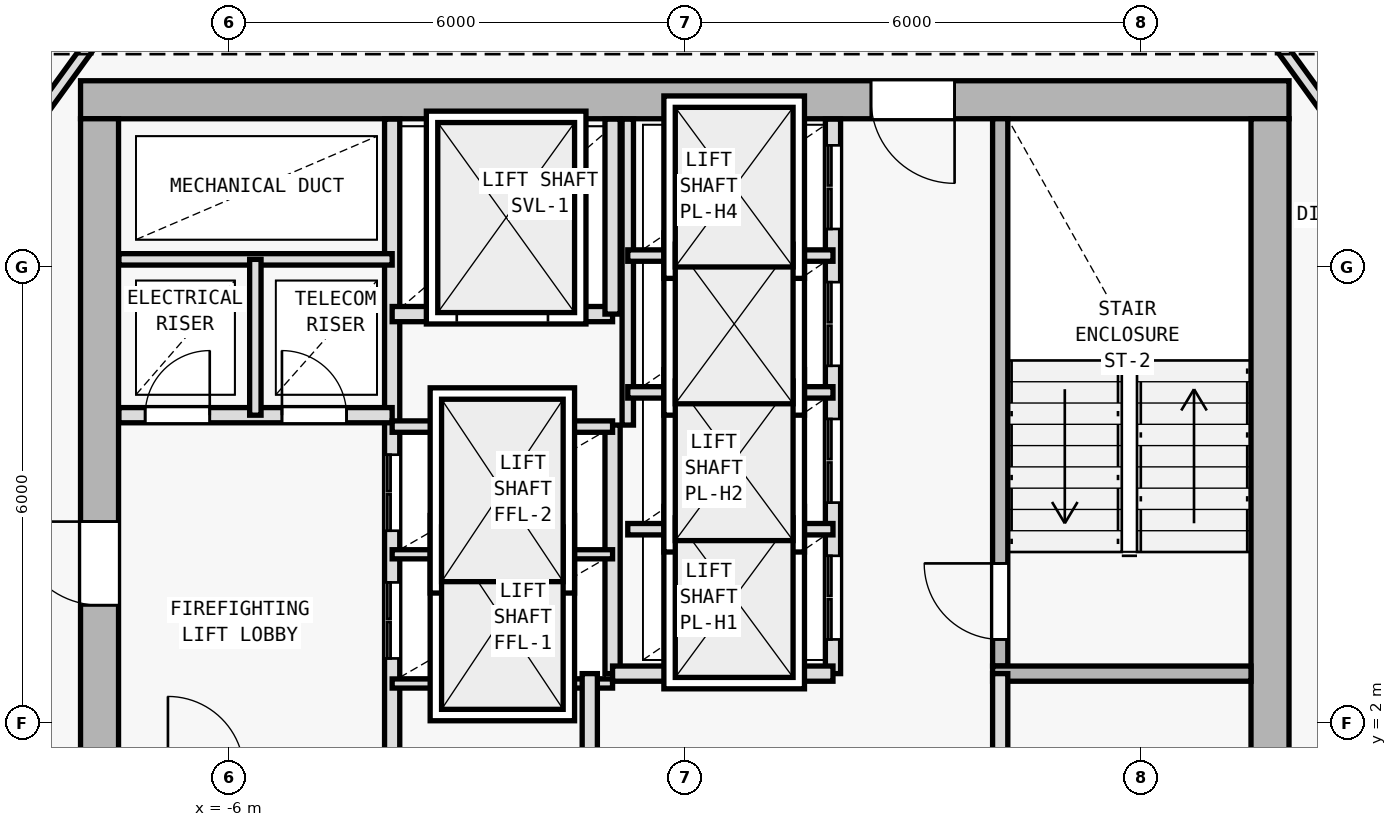
"""IFC4 building model, lengths in metres.
Left out: names, types, materials, properties, quantities, classifications, styles, units other than length and angle.
Written with IfcOpenShell. Run it as: python <this file> out.ifc"""

import sys

from ifc_helpers import new_model, si_unit, direction, frame, frame_2d, origin, origin_2d, place, context, subcontext, project, spatial, rectangle, i_section, extrude, element, fill, save


model = new_model("IFC4")
c1 = context("Model", 3, precision=1e-05, world=origin(), true_north=direction((0.0, 1.0)))
c2 = subcontext(c1, "Body", "Model", "MODEL_VIEW")
j1 = project(units=[si_unit("LENGTHUNIT", "METRE"), si_unit("PLANEANGLEUNIT", "RADIAN")], contexts=[c1])
p1 = place(None, origin())
s1 = spatial("IfcSite", under=j1, at=p1, CompositionType="ELEMENT")
p2 = place(p1, origin())
s2 = spatial("IfcBuilding", under=s1, at=p2, CompositionType="ELEMENT")
p3 = place(p2, frame((0.0, 0.0, 265.2)))
s3 = spatial("IfcBuildingStorey", under=s2, at=p3, CompositionType="ELEMENT", Elevation=265.2)
for number, where, z_axis, x_axis in (
    (1, (7.7, 10.2, 0.0), (0.0, 0.0, 1.0), (1.0, 0.0, 0.0)),
    (2, (-7.7, 10.2, 0.0), (0.0, 0.0, 1.0), (1.0, 0.0, 0.0)),
    (3, (-7.7, 2.0, 0.0), (0.0, 0.0, 1.0), (1.0, 0.0, 0.0)),
):
    element("IfcColumn", number, at=place(p3, frame(where, z_axis=z_axis, x_axis=x_axis)), inside=s3, PredefinedType="COLUMN", context=c2, shape_type="SweptSolid", body=[
        extrude(i_section(OverallWidth=0.374, OverallDepth=0.372, WebThickness=0.012, FlangeThickness=0.02, FilletRadius=0.015, at=origin_2d()), origin(), (0.0, 0.0, 1.0), 3.6),
    ])
p4 = place(p3, frame((7.95, 10.2, 0.0), z_axis=(0.0, 0.0, 1.0), x_axis=(-1.0, 0.0, 0.0)))
e4 = element("IfcWall", 4, at=p4, inside=s3, PredefinedType="SHEAR", context=c2, shape_type="SweptSolid", body=[
    extrude(rectangle(XDim=15.9, YDim=0.5, at=frame_2d((7.95, 0.0))), origin(), (0.0, 0.0, 1.0), 3.35),
])
p5 = place(p4, frame((4.4, 0.0, 0.0)))
e5 = element("IfcOpeningElement", 5, at=p5, cuts=e4, PredefinedType="OPENING", context=c2, shape_type="SweptSolid", body=[
    extrude(rectangle(XDim=1.1, YDim=2.15, at=frame_2d((0.55, 1.075))), frame((0.0, 0.26, 0.0), z_axis=(0.0, -1.0, 0.0), x_axis=(1.0, 0.0, 0.0)), (0.0, 0.0, 1.0), 0.52),
])
p6 = place(p3, frame((-7.7, -9.15, 0.0), z_axis=(0.0, 0.0, 1.0), x_axis=(0.0, 1.0, 0.0)))
e6 = element("IfcWall", 6, at=p6, inside=s3, PredefinedType="SHEAR", context=c2, shape_type="SweptSolid", body=[
    extrude(rectangle(XDim=19.1, YDim=0.5, at=frame_2d((9.55, 0.0))), origin(), (0.0, 0.0, 1.0), 3.35),
])
p7 = place(p6, frame((12.7, 0.0, 0.0)))
e7 = element("IfcOpeningElement", 7, at=p7, cuts=e6, PredefinedType="OPENING", context=c2, shape_type="SweptSolid", body=[
    extrude(rectangle(XDim=1.1, YDim=2.15, at=frame_2d((0.55, 1.075))), frame((0.0, 0.26, 0.0), z_axis=(0.0, -1.0, 0.0), x_axis=(1.0, 0.0, 0.0)), (0.0, 0.0, 1.0), 0.52),
])
p8 = place(p3, frame((7.7, 9.95, 0.0), z_axis=(0.0, 0.0, 1.0), x_axis=(0.0, -1.0, 0.0)))
e8 = element("IfcWall", 8, at=p8, inside=s3, PredefinedType="SHEAR", context=c2, shape_type="SweptSolid", body=[
    extrude(rectangle(XDim=19.1, YDim=0.5, at=frame_2d((9.55, 0.0))), origin(), (0.0, 0.0, 1.0), 3.35),
])
p9 = place(p3, frame((-3.85, 1.35, 0.0), z_axis=(0.0, 0.0, 1.0), x_axis=(0.0, 1.0, 0.0)))
e9 = element("IfcWall", 9, at=p9, inside=s3, PredefinedType="SOLIDWALL", context=c2, shape_type="SweptSolid", body=[
    extrude(rectangle(XDim=8.595, YDim=0.2, at=frame_2d((4.297, 0.0))), origin(), (0.0, 0.0, 1.0), 3.35),
])
p10 = place(p9, frame((1.5, 0.0, 0.0)))
e10 = element("IfcOpeningElement", 10, at=p10, cuts=e9, PredefinedType="OPENING", context=c2, shape_type="SweptSolid", body=[
    extrude(rectangle(XDim=1.0, YDim=2.15, at=frame_2d((0.5, 1.075))), frame((0.0, 0.11, 0.0), z_axis=(0.0, -1.0, 0.0), x_axis=(1.0, 0.0, 0.0)), (0.0, 0.0, 1.0), 0.22),
])
p11 = place(p9, frame((3.18, 0.0, 0.0)))
e11 = element("IfcOpeningElement", 11, at=p11, cuts=e9, PredefinedType="OPENING", context=c2, shape_type="SweptSolid", body=[
    extrude(rectangle(XDim=1.0, YDim=2.15, at=frame_2d((0.5, 1.075))), frame((0.0, 0.11, 0.0), z_axis=(0.0, -1.0, 0.0), x_axis=(1.0, 0.0, 0.0)), (0.0, 0.0, 1.0), 0.22),
])
p12 = place(p3, frame((-7.445, 6.05, 0.0), z_axis=(0.0, 0.0, 1.0), x_axis=(1.0, 0.0, 0.0)))
e12 = element("IfcWall", 12, at=p12, inside=s3, PredefinedType="SOLIDWALL", context=c2, shape_type="SweptSolid", body=[
    extrude(rectangle(XDim=3.595, YDim=0.2, at=frame_2d((1.797, 0.0))), origin(), (0.0, 0.0, 1.0), 3.35),
])
p13 = place(p12, frame((0.345, 0.0, 0.0)))
e13 = element("IfcOpeningElement", 13, at=p13, cuts=e12, PredefinedType="OPENING", context=c2, shape_type="SweptSolid", body=[
    extrude(rectangle(XDim=0.85, YDim=2.1, at=frame_2d((0.425, 1.05))), frame((0.0, 0.11, 0.0), z_axis=(0.0, -1.0, 0.0), x_axis=(1.0, 0.0, 0.0)), (0.0, 0.0, 1.0), 0.22),
])
p14 = place(p12, frame((2.145, 0.0, 0.0)))
e14 = element("IfcOpeningElement", 14, at=p14, cuts=e12, PredefinedType="OPENING", context=c2, shape_type="SweptSolid", body=[
    extrude(rectangle(XDim=0.85, YDim=2.1, at=frame_2d((0.425, 1.05))), frame((0.0, 0.11, 0.0), z_axis=(0.0, -1.0, 0.0), x_axis=(1.0, 0.0, 0.0)), (0.0, 0.0, 1.0), 0.22),
])
p15 = place(p3, frame((-7.445, 8.1, 0.0), z_axis=(0.0, 0.0, 1.0), x_axis=(1.0, 0.0, 0.0)))
e15 = element("IfcWall", 15, at=p15, inside=s3, PredefinedType="PARTITIONING", context=c2, shape_type="SweptSolid", body=[
    extrude(rectangle(XDim=3.595, YDim=0.15, at=frame_2d((1.797, 0.0))), origin(), (0.0, 0.0, 1.0), 3.35),
])
p16 = place(p3, frame((-5.65, 6.05, 0.0), z_axis=(0.0, 0.0, 1.0), x_axis=(0.0, 1.0, 0.0)))
e16 = element("IfcWall", 16, at=p16, inside=s3, PredefinedType="PARTITIONING", context=c2, shape_type="SweptSolid", body=[
    extrude(rectangle(XDim=2.05, YDim=0.15, at=frame_2d((1.025, 0.0))), origin(), (0.0, 0.0, 1.0), 3.35),
])
p17 = place(p3, frame((4.15, 2.75, 0.0), z_axis=(0.0, 0.0, 1.0), x_axis=(0.0, 1.0, 0.0)))
e17 = element("IfcWall", 17, at=p17, inside=s3, PredefinedType="SOLIDWALL", context=c2, shape_type="SweptSolid", body=[
    extrude(rectangle(XDim=7.2, YDim=0.2, at=frame_2d((3.6, 0.0))), origin(), (0.0, 0.0, 1.0), 3.35),
])
p18 = place(p17, frame((0.35, 0.0, 0.0)))
e18 = element("IfcOpeningElement", 18, at=p18, cuts=e17, PredefinedType="OPENING", context=c2, shape_type="SweptSolid", body=[
    extrude(rectangle(XDim=1.0, YDim=2.15, at=frame_2d((0.5, 1.075))), frame((0.0, 0.11, 0.0), z_axis=(0.0, -1.0, 0.0), x_axis=(1.0, 0.0, 0.0)), (0.0, 0.0, 1.0), 0.22),
])
p19 = place(p3, frame((4.05, 2.65, 0.0), z_axis=(0.0, 0.0, 1.0), x_axis=(1.0, 0.0, 0.0)))
e19 = element("IfcWall", 19, at=p19, inside=s3, PredefinedType="SOLIDWALL", context=c2, shape_type="SweptSolid", body=[
    extrude(rectangle(XDim=3.4, YDim=0.2, at=frame_2d((1.7, 0.0))), origin(), (0.0, 0.0, 1.0), 3.35),
])
p20 = place(p3, frame((-0.95, 2.65, 0.0), z_axis=(0.0, 0.0, 1.0), x_axis=(0.0, 1.0, 0.0)))
e20 = element("IfcWall", 20, at=p20, inside=s3, PredefinedType="SOLIDWALL", context=c2, shape_type="SweptSolid", body=[
    extrude(rectangle(XDim=3.27, YDim=0.2, at=frame_2d((1.635, 0.0))), origin(), (0.0, 0.0, 1.0), 3.35),
])
for number, where, z_axis, x_axis in (
    (21, (-3.85, 2.52, 0.0), (0.0, 0.0, 1.0), (1.0, 0.0, 0.0)),
    (22, (-3.85, 4.22, 0.0), (0.0, 0.0, 1.0), (1.0, 0.0, 0.0)),
):
    element("IfcWall", number, at=place(p3, frame(where, z_axis=z_axis, x_axis=x_axis)), inside=s3, PredefinedType="PARTITIONING", context=c2, shape_type="SweptSolid", body=[
        extrude(rectangle(XDim=2.9, YDim=0.12, at=frame_2d((1.45, 0.0))), origin(), (0.0, 0.0, 1.0), 3.35),
    ])
p21 = place(p3, frame((-3.85, 5.9, 0.0), z_axis=(0.0, 0.0, 1.0), x_axis=(1.0, 0.0, 0.0)))
e23 = element("IfcWall", 23, at=p21, inside=s3, PredefinedType="PARTITIONING", context=c2, shape_type="SweptSolid", body=[
    extrude(rectangle(XDim=2.9, YDim=0.15, at=frame_2d((1.45, 0.0))), origin(), (0.0, 0.0, 1.0), 3.35),
])
p22 = place(p3, frame((-3.85, 7.38, 0.0), z_axis=(0.0, 0.0, 1.0), x_axis=(1.0, 0.0, 0.0)))
e24 = element("IfcWall", 24, at=p22, inside=s3, PredefinedType="SOLIDWALL", context=c2, shape_type="SweptSolid", body=[
    extrude(rectangle(XDim=2.9, YDim=0.2, at=frame_2d((1.45, 0.0))), origin(), (0.0, 0.0, 1.0), 3.35),
])
p23 = place(p22, frame((0.85, 0.0, 0.0)))
e25 = element("IfcOpeningElement", 25, at=p23, cuts=e24, PredefinedType="OPENING", context=c2, shape_type="SweptSolid", body=[
    extrude(rectangle(XDim=1.2, YDim=2.2, at=frame_2d((0.6, 1.1))), frame((0.0, 0.11, 0.0), z_axis=(0.0, -1.0, 0.0), x_axis=(1.0, 0.0, 0.0)), (0.0, 0.0, 1.0), 0.22),
])
p24 = place(p3, frame((-0.95, 7.38, 0.0), z_axis=(0.0, 0.0, 1.0), x_axis=(0.0, 1.0, 0.0)))
e26 = element("IfcWall", 26, at=p24, inside=s3, PredefinedType="SOLIDWALL", context=c2, shape_type="SweptSolid", body=[
    extrude(rectangle(XDim=2.565, YDim=0.2, at=frame_2d((1.283, 0.0))), origin(), (0.0, 0.0, 1.0), 3.35),
])
p25 = place(p3, frame((4.15, -6.05, 0.0), z_axis=(0.0, 0.0, 1.0), x_axis=(0.0, 1.0, 0.0)))
e27 = element("IfcWall", 27, at=p25, inside=s3, PredefinedType="SOLIDWALL", context=c2, shape_type="SweptSolid", body=[
    extrude(rectangle(XDim=8.7, YDim=0.2, at=frame_2d((4.35, 0.0))), origin(), (0.0, 0.0, 1.0), 3.35),
])
p26 = place(p25, frame((3.6, 0.0, 0.0)))
e28 = element("IfcOpeningElement", 28, at=p26, cuts=e27, PredefinedType="OPENING", context=c2, shape_type="SweptSolid", body=[
    extrude(rectangle(XDim=0.95, YDim=2.1, at=frame_2d((0.475, 1.05))), frame((0.0, 0.11, 0.0), z_axis=(0.0, -1.0, 0.0), x_axis=(1.0, 0.0, 0.0)), (0.0, 0.0, 1.0), 0.22),
])
p27 = place(p3, frame((-1.25, -6.05, 0.0), z_axis=(0.0, 0.0, 1.0), x_axis=(0.0, 1.0, 0.0)))
e29 = element("IfcWall", 29, at=p27, inside=s3, PredefinedType="SOLIDWALL", context=c2, shape_type="SweptSolid", body=[
    extrude(rectangle(XDim=8.7, YDim=0.2, at=frame_2d((4.35, 0.0))), origin(), (0.0, 0.0, 1.0), 3.35),
])
p28 = place(p27, frame((3.4, 0.0, 0.0)))
e30 = element("IfcOpeningElement", 30, at=p28, cuts=e29, PredefinedType="OPENING", context=c2, shape_type="SweptSolid", body=[
    extrude(rectangle(XDim=0.95, YDim=2.1, at=frame_2d((0.475, 1.05))), frame((0.0, 0.11, 0.0), z_axis=(0.0, -1.0, 0.0), x_axis=(1.0, 0.0, 0.0)), (0.0, 0.0, 1.0), 0.22),
])
p29 = place(p3, frame((1.95, 2.65, 0.0), z_axis=(0.0, 0.0, 1.0), x_axis=(0.0, 1.0, 0.0)))
e31 = element("IfcWall", 31, at=p29, inside=s3, PredefinedType="SOLIDWALL", context=c2, shape_type="SweptSolid", body=[
    extrude(rectangle(XDim=7.295, YDim=0.2, at=frame_2d((3.647, 0.0))), origin(), (0.0, 0.0, 1.0), 3.35),
])
p30 = place(p29, frame((0.45, 0.0, 0.0)))
e32 = element("IfcOpeningElement", 32, at=p30, cuts=e31, PredefinedType="OPENING", context=c2, shape_type="SweptSolid", body=[
    extrude(rectangle(XDim=1.1, YDim=2.15, at=frame_2d((0.55, 1.075))), frame((0.0, 0.11, 0.0), z_axis=(0.0, -1.0, 0.0), x_axis=(1.0, 0.0, 0.0)), (0.0, 0.0, 1.0), 0.22),
])
p31 = place(p29, frame((2.25, 0.0, 0.0)))
e33 = element("IfcOpeningElement", 33, at=p31, cuts=e31, PredefinedType="OPENING", context=c2, shape_type="SweptSolid", body=[
    extrude(rectangle(XDim=1.1, YDim=2.15, at=frame_2d((0.55, 1.075))), frame((0.0, 0.11, 0.0), z_axis=(0.0, -1.0, 0.0), x_axis=(1.0, 0.0, 0.0)), (0.0, 0.0, 1.0), 0.22),
])
p32 = place(p29, frame((4.05, 0.0, 0.0)))
e34 = element("IfcOpeningElement", 34, at=p32, cuts=e31, PredefinedType="OPENING", context=c2, shape_type="SweptSolid", body=[
    extrude(rectangle(XDim=1.1, YDim=2.15, at=frame_2d((0.55, 1.075))), frame((0.0, 0.11, 0.0), z_axis=(0.0, -1.0, 0.0), x_axis=(1.0, 0.0, 0.0)), (0.0, 0.0, 1.0), 0.22),
])
p33 = place(p29, frame((5.85, 0.0, 0.0)))
e35 = element("IfcOpeningElement", 35, at=p33, cuts=e31, PredefinedType="OPENING", context=c2, shape_type="SweptSolid", body=[
    extrude(rectangle(XDim=1.1, YDim=2.15, at=frame_2d((0.55, 1.075))), frame((0.0, 0.11, 0.0), z_axis=(0.0, -1.0, 0.0), x_axis=(1.0, 0.0, 0.0)), (0.0, 0.0, 1.0), 0.22),
])
p34 = place(p3, frame((-0.95, 2.65, 0.0), z_axis=(0.0, 0.0, 1.0), x_axis=(1.0, 0.0, 0.0)))
e36 = element("IfcWall", 36, at=p34, inside=s3, PredefinedType="SOLIDWALL", context=c2, shape_type="SweptSolid", body=[
    extrude(rectangle(XDim=2.9, YDim=0.2, at=frame_2d((1.45, 0.0))), origin(), (0.0, 0.0, 1.0), 3.35),
])
p35 = place(p3, frame((-0.75, 5.92, 0.0), z_axis=(0.0, 0.0, 1.0), x_axis=(0.0, 1.0, 0.0)))
e37 = element("IfcWall", 37, at=p35, inside=s3, PredefinedType="PARTITIONING", context=c2, shape_type="SweptSolid", body=[
    extrude(rectangle(XDim=4.025, YDim=0.15, at=frame_2d((2.013, 0.0))), origin(), (0.0, 0.0, 1.0), 3.35),
])
for number, where, z_axis, x_axis in (
    (38, (-0.75, 4.55, 0.0), (0.0, 0.0, 1.0), (1.0, 0.0, 0.0)),
    (39, (-0.75, 6.35, 0.0), (0.0, 0.0, 1.0), (1.0, 0.0, 0.0)),
    (40, (-0.75, 8.15, 0.0), (0.0, 0.0, 1.0), (1.0, 0.0, 0.0)),
):
    element("IfcWall", number, at=place(p3, frame(where, z_axis=z_axis, x_axis=x_axis)), inside=s3, PredefinedType="PARTITIONING", context=c2, shape_type="SweptSolid", body=[
        extrude(rectangle(XDim=2.7, YDim=0.15, at=frame_2d((1.35, 0.0))), origin(), (0.0, 0.0, 1.0), 3.35),
    ])
p36 = place(p3, frame((-9.78, 8.226, 0.0), z_axis=(0.0, 0.0, 1.0), x_axis=(0.586956386413, 0.809618552436, 0.0)))
e41 = element("IfcWall", 41, at=p36, inside=s3, PredefinedType="PARTITIONING", context=c2, shape_type="SweptSolid", body=[
    extrude(rectangle(XDim=5.008, YDim=0.15, at=frame_2d((2.504, 0.0))), origin(), (0.0, 0.0, 1.0), 3.015),
])
p37 = place(p3, frame((6.841, 12.28, 0.0), z_axis=(0.0, 0.0, 1.0), x_axis=(0.586956386413, -0.809618552436, 0.0)))
e42 = element("IfcWall", 42, at=p37, inside=s3, PredefinedType="PARTITIONING", context=c2, shape_type="SweptSolid", body=[
    extrude(rectangle(XDim=5.008, YDim=0.15, at=frame_2d((2.504, 0.0))), origin(), (0.0, 0.0, 1.0), 2.965),
])
p38 = place(p37, frame((2.954, 0.0, 0.0)))
e43 = element("IfcOpeningElement", 43, at=p38, cuts=e42, PredefinedType="OPENING", context=c2, shape_type="SweptSolid", body=[
    extrude(rectangle(XDim=0.9, YDim=2.1, at=frame_2d((0.45, 1.05))), frame((0.0, 0.085, 0.0), z_axis=(0.0, -1.0, 0.0), x_axis=(1.0, 0.0, 0.0)), (0.0, 0.0, 1.0), 0.17),
])
p39 = place(p7, origin())
e44 = element("IfcDoor", 44, at=p39, inside=s3, OperationType="SINGLE_SWING_RIGHT", PredefinedType="DOOR", context=c2, shape_type="SweptSolid", body=[
    extrude(rectangle(XDim=1.1, YDim=2.15, at=frame_2d((0.55, 1.075))), frame((0.0, 0.025, 0.0), z_axis=(0.0, -1.0, 0.0), x_axis=(1.0, 0.0, 0.0)), (0.0, 0.0, 1.0), 0.05),
])
fill(e7, e44)
p40 = place(p5, origin())
e45 = element("IfcDoor", 45, at=p40, inside=s3, OperationType="SINGLE_SWING_LEFT", PredefinedType="DOOR", context=c2, shape_type="SweptSolid", body=[
    extrude(rectangle(XDim=1.1, YDim=2.15, at=frame_2d((0.55, 1.075))), frame((0.0, 0.025, 0.0), z_axis=(0.0, -1.0, 0.0), x_axis=(1.0, 0.0, 0.0)), (0.0, 0.0, 1.0), 0.05),
])
fill(e5, e45)
p41 = place(p13, origin())
e46 = element("IfcDoor", 46, at=p41, inside=s3, OperationType="SINGLE_SWING_RIGHT", PredefinedType="DOOR", context=c2, shape_type="SweptSolid", body=[
    extrude(rectangle(XDim=0.85, YDim=2.1, at=frame_2d((0.425, 1.05))), frame((0.0, 0.025, 0.0), z_axis=(0.0, -1.0, 0.0), x_axis=(1.0, 0.0, 0.0)), (0.0, 0.0, 1.0), 0.05),
])
fill(e13, e46)
p42 = place(p14, origin())
e47 = element("IfcDoor", 47, at=p42, inside=s3, OperationType="SINGLE_SWING_LEFT", PredefinedType="DOOR", context=c2, shape_type="SweptSolid", body=[
    extrude(rectangle(XDim=0.85, YDim=2.1, at=frame_2d((0.425, 1.05))), frame((0.0, 0.025, 0.0), z_axis=(0.0, -1.0, 0.0), x_axis=(1.0, 0.0, 0.0)), (0.0, 0.0, 1.0), 0.05),
])
fill(e14, e47)
p43 = place(p18, origin())
e48 = element("IfcDoor", 48, at=p43, inside=s3, OperationType="SINGLE_SWING_RIGHT", PredefinedType="DOOR", context=c2, shape_type="SweptSolid", body=[
    extrude(rectangle(XDim=1.0, YDim=2.15, at=frame_2d((0.5, 1.075))), frame((0.0, 0.025, 0.0), z_axis=(0.0, -1.0, 0.0), x_axis=(1.0, 0.0, 0.0)), (0.0, 0.0, 1.0), 0.05),
])
fill(e18, e48)
p44 = place(p23, origin())
e49 = element("IfcDoor", 49, at=p44, inside=s3, OperationType="DOUBLE_DOOR_SLIDING", PredefinedType="DOOR", context=c2, shape_type="SweptSolid", body=[
    extrude(rectangle(XDim=1.2, YDim=2.2, at=frame_2d((0.6, 1.1))), frame((0.0, 0.025, 0.0), z_axis=(0.0, -1.0, 0.0), x_axis=(1.0, 0.0, 0.0)), (0.0, 0.0, 1.0), 0.05),
])
fill(e25, e49)
p45 = place(p30, origin())
e50 = element("IfcDoor", 50, at=p45, inside=s3, OperationType="DOUBLE_DOOR_SLIDING", PredefinedType="DOOR", context=c2, shape_type="SweptSolid", body=[
    extrude(rectangle(XDim=1.1, YDim=2.15, at=frame_2d((0.55, 1.075))), frame((0.0, 0.025, 0.0), z_axis=(0.0, -1.0, 0.0), x_axis=(1.0, 0.0, 0.0)), (0.0, 0.0, 1.0), 0.05),
])
fill(e32, e50)
p46 = place(p31, origin())
e51 = element("IfcDoor", 51, at=p46, inside=s3, OperationType="DOUBLE_DOOR_SLIDING", PredefinedType="DOOR", context=c2, shape_type="SweptSolid", body=[
    extrude(rectangle(XDim=1.1, YDim=2.15, at=frame_2d((0.55, 1.075))), frame((0.0, 0.025, 0.0), z_axis=(0.0, -1.0, 0.0), x_axis=(1.0, 0.0, 0.0)), (0.0, 0.0, 1.0), 0.05),
])
fill(e33, e51)
p47 = place(p32, origin())
e52 = element("IfcDoor", 52, at=p47, inside=s3, OperationType="DOUBLE_DOOR_SLIDING", PredefinedType="DOOR", context=c2, shape_type="SweptSolid", body=[
    extrude(rectangle(XDim=1.1, YDim=2.15, at=frame_2d((0.55, 1.075))), frame((0.0, 0.025, 0.0), z_axis=(0.0, -1.0, 0.0), x_axis=(1.0, 0.0, 0.0)), (0.0, 0.0, 1.0), 0.05),
])
fill(e34, e52)
p48 = place(p33, origin())
e53 = element("IfcDoor", 53, at=p48, inside=s3, OperationType="DOUBLE_DOOR_SLIDING", PredefinedType="DOOR", context=c2, shape_type="SweptSolid", body=[
    extrude(rectangle(XDim=1.1, YDim=2.15, at=frame_2d((0.55, 1.075))), frame((0.0, 0.025, 0.0), z_axis=(0.0, -1.0, 0.0), x_axis=(1.0, 0.0, 0.0)), (0.0, 0.0, 1.0), 0.05),
])
fill(e35, e53)
p49 = place(p10, origin())
e54 = element("IfcDoor", 54, at=p49, inside=s3, OperationType="DOUBLE_DOOR_SLIDING", PredefinedType="DOOR", context=c2, shape_type="SweptSolid", body=[
    extrude(rectangle(XDim=1.0, YDim=2.15, at=frame_2d((0.5, 1.075))), frame((0.0, 0.025, 0.0), z_axis=(0.0, -1.0, 0.0), x_axis=(1.0, 0.0, 0.0)), (0.0, 0.0, 1.0), 0.05),
])
fill(e10, e54)
p50 = place(p11, origin())
e55 = element("IfcDoor", 55, at=p50, inside=s3, OperationType="DOUBLE_DOOR_SLIDING", PredefinedType="DOOR", context=c2, shape_type="SweptSolid", body=[
    extrude(rectangle(XDim=1.0, YDim=2.15, at=frame_2d((0.5, 1.075))), frame((0.0, 0.025, 0.0), z_axis=(0.0, -1.0, 0.0), x_axis=(1.0, 0.0, 0.0)), (0.0, 0.0, 1.0), 0.05),
])
fill(e11, e55)
save(model, sys.argv[1])
